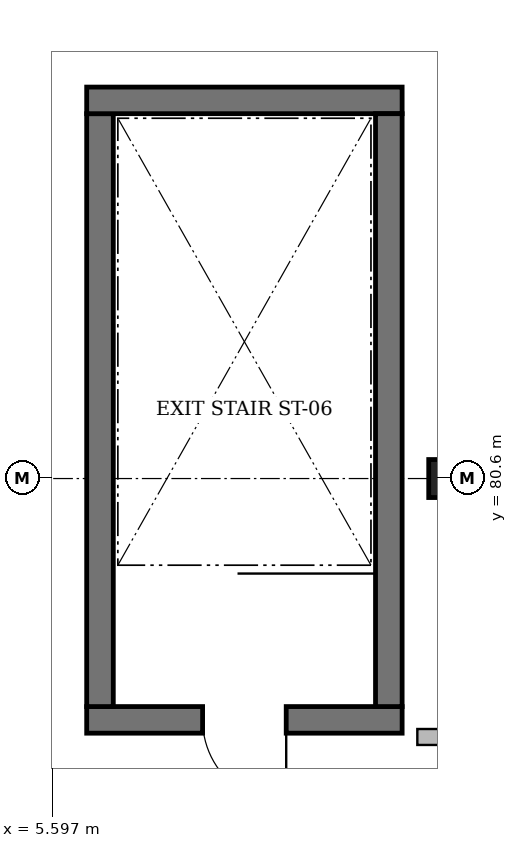
"""IFC4 building model, lengths in metres.
Left out: names, types, materials, properties, quantities, classifications, styles, units other than length and angle.
Written with IfcOpenShell. Run it as: python <this file> out.ifc"""

import sys

from ifc_helpers import new_model, si_unit, direction, frame, frame_2d, origin, origin_2d, place, context, subcontext, project, spatial, rectangle, extrude, element, fill, save


model = new_model("IFC4")
c1 = context("Model", 3, precision=1e-05, world=origin(), true_north=direction((0.0, 1.0)))
c2 = subcontext(c1, "Body", "Model", "MODEL_VIEW")
j1 = project(units=[si_unit("LENGTHUNIT", "METRE"), si_unit("PLANEANGLEUNIT", "RADIAN")], contexts=[c1])
p1 = place(None, origin())
s1 = spatial("IfcSite", under=j1, at=p1, CompositionType="ELEMENT")
p2 = place(p1, origin())
s2 = spatial("IfcBuilding", under=s1, at=p2, CompositionType="ELEMENT")
p3 = place(p2, frame((0.0, 0.0, 13.2)))
s3 = spatial("IfcBuildingStorey", under=s2, at=p3, CompositionType="ELEMENT", Elevation=13.2)
p4 = place(p3, frame((10.8, 80.6, 0.0), z_axis=(0.0, 0.0, 1.0), x_axis=(1.0, 0.0, 0.0)))
e1 = element("IfcColumn", 1, at=p4, inside=s3, PredefinedType="COLUMN", context=c2, shape_type="SweptSolid", body=[
    extrude(rectangle(XDim=0.5, YDim=0.5, at=origin_2d()), origin(), (0.0, 0.0, 1.0), 3.71),
])
p5 = place(p3, frame((10.2, 77.425, 0.0), z_axis=(0.0, 0.0, 1.0), x_axis=(-1.0, 0.0, 0.0)))
e2 = element("IfcWall", 2, at=p5, inside=s3, PredefinedType="SOLIDWALL", context=c2, shape_type="SweptSolid", body=[
    extrude(rectangle(XDim=4.15, YDim=0.35, at=frame_2d((2.075, 0.0))), origin(), (0.0, 0.0, 1.0), 3.6),
])
p6 = place(p5, frame((1.525, 0.0, 0.0)))
e3 = element("IfcOpeningElement", 3, at=p6, cuts=e2, PredefinedType="OPENING", context=c2, shape_type="SweptSolid", body=[
    extrude(rectangle(XDim=1.1, YDim=2.15, at=frame_2d((0.55, 1.075))), frame((0.0, 0.195, 0.0), z_axis=(0.0, -1.0, 0.0), x_axis=(1.0, 0.0, 0.0)), (0.0, 0.0, 1.0), 0.39),
])
p7 = place(p3, frame((6.225, 77.6, 0.0), z_axis=(0.0, 0.0, 1.0), x_axis=(0.0, 1.0, 0.0)))
e4 = element("IfcWall", 4, at=p7, inside=s3, PredefinedType="SOLIDWALL", context=c2, shape_type="SweptSolid", body=[
    extrude(rectangle(XDim=7.8, YDim=0.35, at=frame_2d((3.9, 0.0))), origin(), (0.0, 0.0, 1.0), 3.6),
])
p8 = place(p3, frame((6.05, 85.575, 0.0), z_axis=(0.0, 0.0, 1.0), x_axis=(1.0, 0.0, 0.0)))
e5 = element("IfcWall", 5, at=p8, inside=s3, PredefinedType="SOLIDWALL", context=c2, shape_type="SweptSolid", body=[
    extrude(rectangle(XDim=4.15, YDim=0.35, at=frame_2d((2.075, 0.0))), origin(), (0.0, 0.0, 1.0), 3.6),
])
p9 = place(p3, frame((10.025, 85.4, 0.0), z_axis=(0.0, 0.0, 1.0), x_axis=(0.0, -1.0, 0.0)))
e6 = element("IfcWall", 6, at=p9, inside=s3, PredefinedType="SOLIDWALL", context=c2, shape_type="SweptSolid", body=[
    extrude(rectangle(XDim=7.8, YDim=0.35, at=frame_2d((3.9, 0.0))), origin(), (0.0, 0.0, 1.0), 3.6),
])
p10 = place(p3, frame((5.75, 87.193, 0.0), z_axis=(0.0, 0.0, 1.0), x_axis=(-0.696365862768, -0.71768696879, 0.0)))
e7 = element("IfcWall", 7, at=p10, inside=s3, PredefinedType="SOLIDWALL", context=c2, shape_type="SweptSolid", body=[
    extrude(rectangle(XDim=3.95, YDim=0.28, at=frame_2d((1.975, 0.0))), origin(), (0.0, 0.0, 1.0), 3.75),
])
p11 = place(p10, frame((1.2, 0.0, 0.95)))
e8 = element("IfcOpeningElement", 8, at=p11, cuts=e7, PredefinedType="OPENING", context=c2, shape_type="SweptSolid", body=[
    extrude(rectangle(XDim=1.55, YDim=1.8, at=frame_2d((0.775, 0.9))), frame((0.0, 0.16, 0.0), z_axis=(0.0, -1.0, 0.0), x_axis=(1.0, 0.0, 0.0)), (0.0, 0.0, 1.0), 0.32),
])
p12 = place(p3, frame((19.8, 77.2, 0.0), z_axis=(0.0, 0.0, 1.0), x_axis=(-1.0, 0.0, 0.0)))
e9 = element("IfcWall", 9, at=p12, inside=s3, PredefinedType="PARTITIONING", context=c2, shape_type="SweptSolid", body=[
    extrude(rectangle(XDim=9.4, YDim=0.21, at=frame_2d((4.7, 0.0))), origin(), (0.0, 0.0, 1.0), 3.66),
])
p13 = place(p12, frame((4.298, 0.0, 0.0)))
e10 = element("IfcOpeningElement", 10, at=p13, cuts=e9, PredefinedType="OPENING", context=c2, shape_type="SweptSolid", body=[
    extrude(rectangle(XDim=1.05, YDim=2.25, at=frame_2d((0.525, 1.125))), frame((0.0, 0.125, 0.0), z_axis=(0.0, -1.0, 0.0), x_axis=(1.0, 0.0, 0.0)), (0.0, 0.0, 1.0), 0.25),
])
p14 = place(p6, origin())
e11 = element("IfcDoor", 11, at=p14, inside=s3, OperationType="SINGLE_SWING_LEFT", PredefinedType="DOOR", context=c2, shape_type="SweptSolid", body=[
    extrude(rectangle(XDim=1.1, YDim=2.15, at=frame_2d((0.55, 1.075))), frame((0.0, 0.025, 0.0), z_axis=(0.0, -1.0, 0.0), x_axis=(1.0, 0.0, 0.0)), (0.0, 0.0, 1.0), 0.05),
])
fill(e3, e11)
save(model, sys.argv[1])
